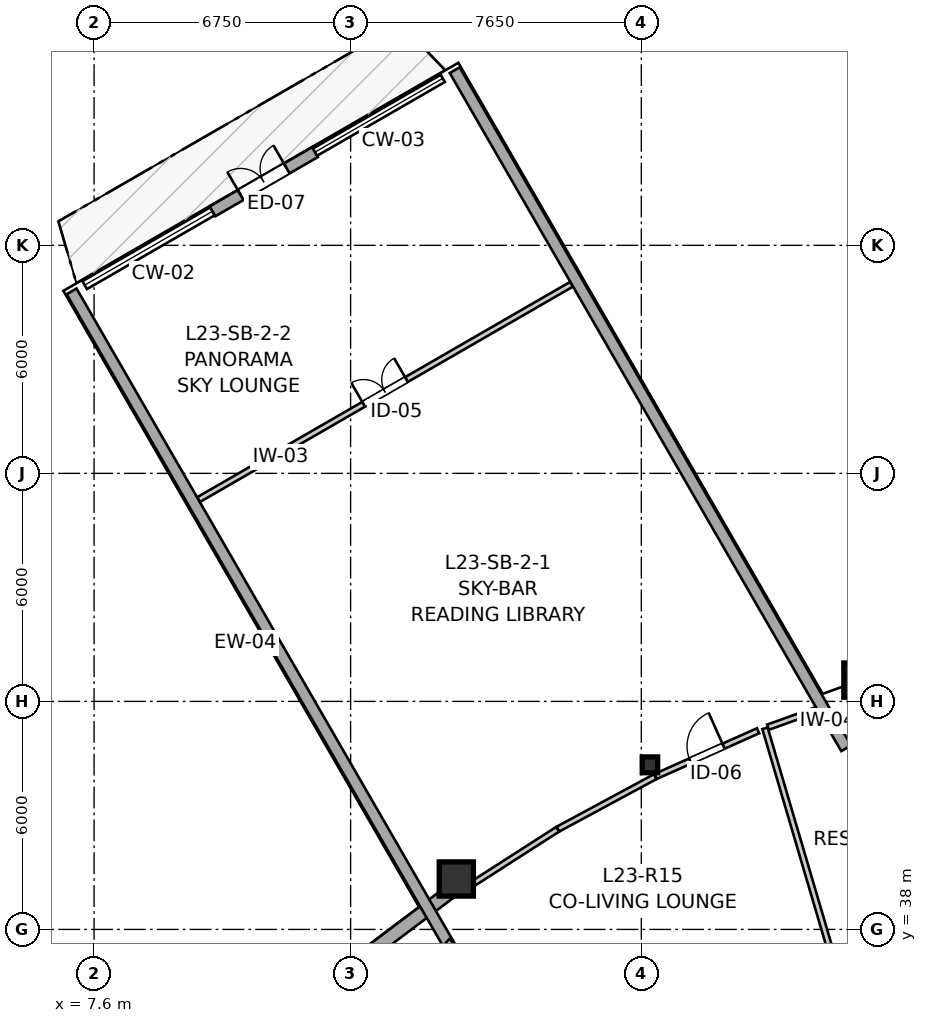
"""IFC4 building model, lengths in metres.
Left out: names, types, materials, properties, quantities, classifications, styles, units other than length and angle.
Written with IfcOpenShell. Run it as: python <this file> out.ifc"""

import sys

from ifc_helpers import new_model, si_unit, direction, frame, frame_2d, origin, origin_2d, place, context, subcontext, project, spatial, rectangle, i_section, extrude, source, transform, mapped, element, fill, save


model = new_model("IFC4")
c1 = context("Model", 3, precision=1e-05, world=origin(), true_north=direction((0.0, 1.0)))
c2 = subcontext(c1, "Body", "Model", "MODEL_VIEW")
j1 = project(units=[si_unit("LENGTHUNIT", "METRE"), si_unit("PLANEANGLEUNIT", "RADIAN")], contexts=[c1])
p1 = place(None, origin())
s1 = spatial("IfcSite", under=j1, at=p1, CompositionType="ELEMENT")
p2 = place(p1, origin())
s2 = spatial("IfcBuilding", under=s1, at=p2, CompositionType="ELEMENT")
p3 = place(p2, frame((0.0, 0.0, 80.0)))
s3 = spatial("IfcBuildingStorey", under=s2, at=p3, CompositionType="ELEMENT", Elevation=80.0)
m1 = source(origin(), c2, "Body", "SweptSolid", [
    extrude(rectangle(XDim=0.9, YDim=0.9, at=origin_2d()), origin(), (0.0, 0.0, 1.0), 2.935),
])
p4 = place(p3, frame((27.779, 44.561, 0.0), z_axis=(0.0, 0.0, 1.0), x_axis=(1.0, 0.0, 0.0)))
e1 = element("IfcColumn", 1, at=p4, inside=s3, PredefinedType="COLUMN", context=c2, shape_type="MappedRepresentation", body=[
    mapped(m1, transform((0.0, 0.0, 0.0), x_axis=(1.0, 0.0, 0.0), y_axis=(0.0, 1.0, 0.0), z_axis=(0.0, 0.0, 1.0), scale=1.0)),
])
m2 = source(origin(), c2, "Body", "SweptSolid", [
    extrude(i_section(OverallWidth=0.406, OverallDepth=0.416, WebThickness=0.027, FlangeThickness=0.044, FilletRadius=0.015, at=origin_2d()), origin(), (0.0, 0.0, 1.0), 2.935),
])
p5 = place(p3, frame((22.227, 42.331, 0.0), z_axis=(0.0, 0.0, 1.0), x_axis=(1.0, 0.0, 0.0)))
e2 = element("IfcColumn", 2, at=p5, inside=s3, PredefinedType="PILASTER", context=c2, shape_type="MappedRepresentation", body=[
    mapped(m2, transform((0.0, 0.0, 0.0), x_axis=(1.0, 0.0, 0.0), y_axis=(0.0, 1.0, 0.0), z_axis=(0.0, 0.0, 1.0), scale=1.0)),
])
p6 = place(p3, frame((17.131, 39.327, 0.0), z_axis=(0.0, 0.0, 1.0), x_axis=(1.0, 0.0, 0.0)))
e3 = element("IfcColumn", 3, at=p6, inside=s3, PredefinedType="COLUMN", context=c2, shape_type="MappedRepresentation", body=[
    mapped(m1, transform((0.0, 0.0, 0.0), x_axis=(1.0, 0.0, 0.0), y_axis=(0.0, 1.0, 0.0), z_axis=(0.0, 0.0, 1.0), scale=1.0)),
])
p7 = place(p3, frame((17.057, 39.052, 0.0), z_axis=(0.0, 0.0, 1.0), x_axis=(-0.798379678642, -0.602154372841, 0.0)))
e4 = element("IfcWall", 4, at=p7, inside=s3, PredefinedType="SOLIDWALL", context=c2, shape_type="SweptSolid", body=[
    extrude(rectangle(XDim=2.79, YDim=0.35, at=frame_2d((1.395, 0.0))), origin(), (0.0, 0.0, 1.0), 2.465),
])
for number, where, z_axis, x_axis in (
    (5, (17.31, 36.946, 0.0), (0.0, 0.0, 1.0), (-0.5, 0.866, 0.0)),
    (6, (27.39, 42.766, 0.0), (0.0, 0.0, 1.0), (-0.5, 0.866, 0.0)),
):
    element("IfcWall", number, at=place(p3, frame(where, z_axis=z_axis, x_axis=x_axis)), inside=s3, PredefinedType="SOLIDWALL", context=c2, shape_type="SweptSolid", body=[
        extrude(rectangle(XDim=20.603, YDim=0.3, at=frame_2d((10.302, 0.0))), origin(), (0.0, 0.0, 1.0), 2.115),
    ])
p8 = place(p3, frame((10.712, 56.893, 0.0), z_axis=(0.0, 0.0, 1.0), x_axis=(0.866029224906, 0.499993381564, 0.0)))
e7 = element("IfcWall", 7, at=p8, inside=s3, PredefinedType="SOLIDWALL", context=c2, shape_type="SweptSolid", body=[
    extrude(rectangle(XDim=3.12, YDim=0.3, at=frame_2d((1.56, 0.0))), origin(), (0.0, 0.0, 1.0), 2.3),
])
p9 = place(p8, frame((0.86, 0.0, 0.0)))
e8 = element("IfcOpeningElement", 8, at=p9, cuts=e7, PredefinedType="OPENING", context=c2, shape_type="SweptSolid", body=[
    extrude(rectangle(XDim=1.4, YDim=2.15, at=frame_2d((0.7, 1.075))), frame((0.0, 0.16, 0.0), z_axis=(0.0, -1.0, 0.0), x_axis=(1.0, 0.0, 0.0)), (0.0, 0.0, 1.0), 0.32),
])
p10 = place(p3, frame((10.353, 49.312, 0.0), z_axis=(0.0, 0.0, 1.0), x_axis=(0.866036235619, 0.499981238243, 0.0)))
e9 = element("IfcWall", 9, at=p10, inside=s3, PredefinedType="PARTITIONING", context=c2, shape_type="SweptSolid", body=[
    extrude(rectangle(XDim=11.324, YDim=0.145, at=frame_2d((5.662, 0.0))), origin(), (0.0, 0.0, 1.0), 2.353),
])
p11 = place(p10, frame((5.012, 0.0, 0.0)))
e10 = element("IfcOpeningElement", 10, at=p11, cuts=e9, PredefinedType="OPENING", context=c2, shape_type="SweptSolid", body=[
    extrude(rectangle(XDim=1.3, YDim=2.1, at=frame_2d((0.65, 1.05))), frame((0.0, 0.083, 0.0), z_axis=(0.0, -1.0, 0.0), x_axis=(1.0, 0.0, 0.0)), (0.0, 0.0, 1.0), 0.165),
])
p12 = place(p3, frame((22.377, 42.026, 0.0), z_axis=(0.0, 0.0, 1.0), x_axis=(0.913387960111, 0.407090204162, 0.0)))
e11 = element("IfcWall", 11, at=p12, inside=s3, PredefinedType="PARTITIONING", context=c2, shape_type="SweptSolid", body=[
    extrude(rectangle(XDim=2.951, YDim=0.145, at=frame_2d((1.475, 0.0))), origin(), (0.0, 0.0, 1.0), 2.453),
])
p13 = place(p12, frame((0.995, 0.0, 0.0)))
e12 = element("IfcOpeningElement", 12, at=p13, cuts=e11, PredefinedType="OPENING", context=c2, shape_type="SweptSolid", body=[
    extrude(rectangle(XDim=0.96, YDim=2.1, at=frame_2d((0.48, 1.05))), frame((0.0, 0.083, 0.0), z_axis=(0.0, -1.0, 0.0), x_axis=(1.0, 0.0, 0.0)), (0.0, 0.0, 1.0), 0.165),
])
p14 = place(p3, frame((16.895, 37.69, 0.0), z_axis=(0.0, 0.0, 1.0), x_axis=(0.754854710059, -0.655892038907, 0.0)))
e13 = element("IfcWall", 13, at=p14, inside=s3, PredefinedType="PARTITIONING", context=c2, shape_type="SweptSolid", body=[
    extrude(rectangle(XDim=6.811, YDim=0.145, at=frame_2d((3.406, 0.0))), origin(), (0.0, 0.0, 1.0), 2.103),
])
p15 = place(p3, frame((25.254, 43.292, 0.0), z_axis=(0.0, 0.0, 1.0), x_axis=(0.282661880608, -0.959219610543, 0.0)))
e14 = element("IfcWall", 14, at=p15, inside=s3, PredefinedType="PARTITIONING", context=c2, shape_type="SweptSolid", body=[
    extrude(rectangle(XDim=7.041, YDim=0.145, at=frame_2d((3.521, 0.0))), origin(), (0.0, 0.0, 1.0), 2.935),
])
p16 = place(p3, frame((17.326, 39.048, 0.0), z_axis=(0.0, 0.0, 1.0), x_axis=(0.841527071554, 0.540214945963, 0.0)))
e15 = element("IfcWall", 15, at=p16, inside=s3, PredefinedType="PARTITIONING", context=c2, shape_type="SweptSolid", body=[
    extrude(rectangle(XDim=2.934, YDim=0.145, at=frame_2d((1.467, 0.0))), origin(), (0.0, 0.0, 1.0), 2.453),
])
p17 = place(p3, frame((19.808, 40.64, 0.0), z_axis=(0.0, 0.0, 1.0), x_axis=(0.880106382364, 0.474776532404, 0.0)))
e16 = element("IfcWall", 16, at=p17, inside=s3, PredefinedType="PARTITIONING", context=c2, shape_type="SweptSolid", body=[
    extrude(rectangle(XDim=2.904, YDim=0.145, at=frame_2d((1.452, 0.0))), origin(), (0.0, 0.0, 1.0), 2.453),
])
p18 = place(p3, frame((25.334, 43.321, 0.0), z_axis=(0.0, 0.0, 1.0), x_axis=(0.940956330278, 0.3385279671, 0.0)))
e17 = element("IfcWall", 17, at=p18, inside=s3, PredefinedType="PARTITIONING", context=c2, shape_type="SweptSolid", body=[
    extrude(rectangle(XDim=1.354, YDim=0.145, at=frame_2d((0.677, 0.0))), origin(), (0.0, 0.0, 1.0), 2.453),
])
m3 = source(origin(), c2, "Body", "SweptSolid", [
    extrude(rectangle(XDim=1.4, YDim=2.15, at=frame_2d((0.7, 1.075))), frame((0.0, 0.025, 0.0), z_axis=(0.0, -1.0, 0.0), x_axis=(1.0, 0.0, 0.0)), (0.0, 0.0, 1.0), 0.05),
])
p19 = place(p9, origin())
e18 = element("IfcDoor", 18, at=p19, inside=s3, OperationType="DOUBLE_DOOR_SINGLE_SWING", PredefinedType="DOOR", context=c2, shape_type="MappedRepresentation", body=[
    mapped(m3, transform((0.0, 0.0, 0.0), x_axis=(1.0, 0.0, 0.0), y_axis=(0.0, 1.0, 0.0), z_axis=(0.0, 0.0, 1.0), scale=1.0)),
])
fill(e8, e18)
m4 = source(origin(), c2, "Body", "SweptSolid", [
    extrude(rectangle(XDim=1.3, YDim=2.1, at=frame_2d((0.65, 1.05))), frame((0.0, 0.025, 0.0), z_axis=(0.0, -1.0, 0.0), x_axis=(1.0, 0.0, 0.0)), (0.0, 0.0, 1.0), 0.05),
])
p20 = place(p11, origin())
e19 = element("IfcDoor", 19, at=p20, inside=s3, OperationType="DOUBLE_DOOR_SINGLE_SWING", PredefinedType="DOOR", context=c2, shape_type="MappedRepresentation", body=[
    mapped(m4, transform((0.0, 0.0, 0.0), x_axis=(1.0, 0.0, 0.0), y_axis=(0.0, 1.0, 0.0), z_axis=(0.0, 0.0, 1.0), scale=1.0)),
])
fill(e10, e19)
m5 = source(origin(), c2, "Body", "SweptSolid", [
    extrude(rectangle(XDim=0.96, YDim=2.1, at=frame_2d((0.48, 1.05))), frame((0.0, 0.025, 0.0), z_axis=(0.0, -1.0, 0.0), x_axis=(1.0, 0.0, 0.0)), (0.0, 0.0, 1.0), 0.05),
])
p21 = place(p13, origin())
e20 = element("IfcDoor", 20, at=p21, inside=s3, OperationType="SINGLE_SWING_RIGHT", PredefinedType="DOOR", context=c2, shape_type="MappedRepresentation", body=[
    mapped(m5, transform((0.0, 0.0, 0.0), x_axis=(1.0, 0.0, 0.0), y_axis=(0.0, 1.0, 0.0), z_axis=(0.0, 0.0, 1.0), scale=1.0)),
])
fill(e12, e20)
save(model, sys.argv[1])
